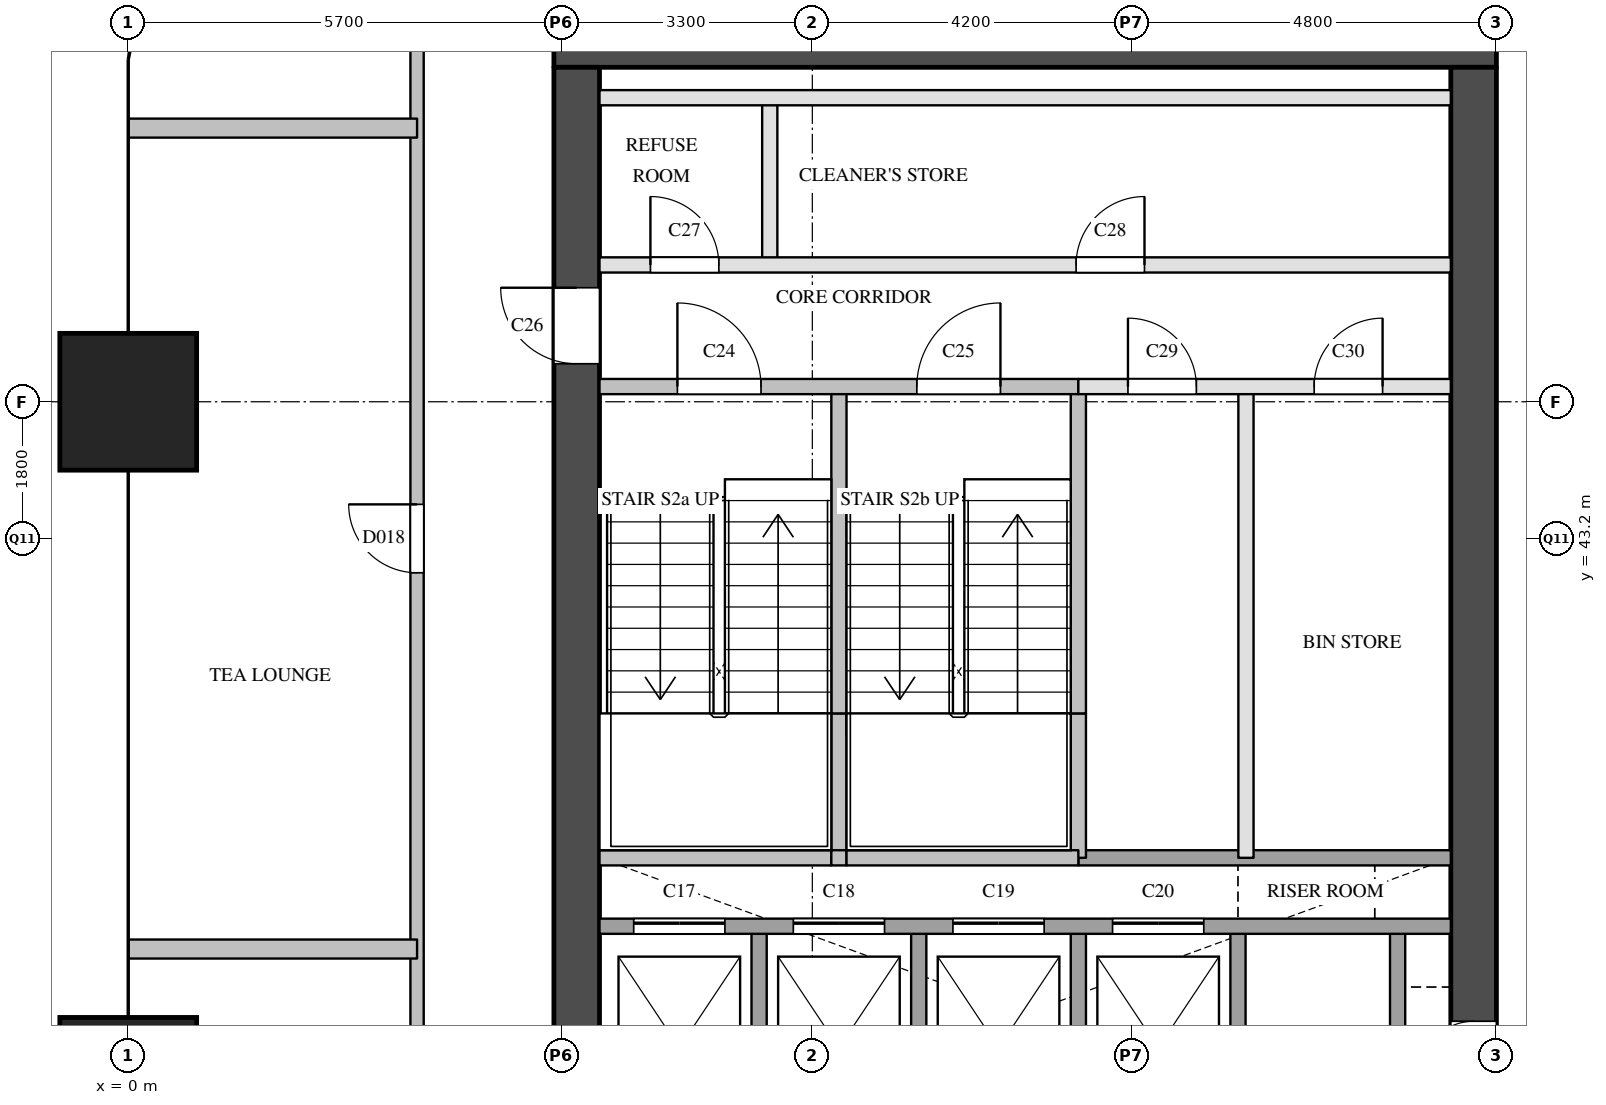
"""IFC4 building model, lengths in metres.
Left out: names, types, materials, properties, quantities, classifications, styles, units other than length and angle.
Written with IfcOpenShell. Run it as: python <this file> out.ifc"""

import sys

from ifc_helpers import new_model, si_unit, direction, frame, frame_2d, origin, origin_2d, place, context, subcontext, project, spatial, rectangle, extrude, element, fill, save


model = new_model("IFC4")
c1 = context("Model", 3, precision=1e-05, world=origin(), true_north=direction((0.0, 1.0)))
c2 = subcontext(c1, "Body", "Model", "MODEL_VIEW")
j1 = project(units=[si_unit("LENGTHUNIT", "METRE"), si_unit("PLANEANGLEUNIT", "RADIAN")], contexts=[c1])
p1 = place(None, origin())
s1 = spatial("IfcSite", under=j1, at=p1, CompositionType="ELEMENT")
p2 = place(p1, origin())
s2 = spatial("IfcBuilding", under=s1, at=p2, CompositionType="ELEMENT")
p3 = place(p2, frame((0.0, 0.0, 89.2)))
s3 = spatial("IfcBuildingStorey", under=s2, at=p3, CompositionType="ELEMENT", Elevation=89.2)
for number, where, z_axis, x_axis in (
    (1, (0.0, 36.0, 0.0), (0.0, 0.0, 1.0), (1.0, 0.0, 0.0)),
    (2, (0.0, 45.0, 0.0), (0.0, 0.0, 1.0), (1.0, 0.0, 0.0)),
):
    element("IfcColumn", number, at=place(p3, frame(where, z_axis=z_axis, x_axis=x_axis)), inside=s3, PredefinedType="COLUMN", context=c2, shape_type="SweptSolid", body=[
        extrude(rectangle(XDim=1.8, YDim=1.8, at=origin_2d()), origin(), (0.0, 0.0, 1.0), 3.8),
    ])
p4 = place(p3, frame((5.6, 49.7, 0.0), z_axis=(0.0, 0.0, 1.0), x_axis=(1.0, 0.0, 0.0)))
e3 = element("IfcWall", 3, at=p4, inside=s3, PredefinedType="SHEAR", context=c2, shape_type="SweptSolid", body=[
    extrude(rectangle(XDim=12.4, YDim=0.6, at=frame_2d((6.2, 0.0))), origin(), (0.0, 0.0, 1.0), 3.5),
])
p5 = place(p3, frame((5.9, 29.1, 0.0), z_axis=(0.0, 0.0, 1.0), x_axis=(0.0, 1.0, 0.0)))
e4 = element("IfcWall", 4, at=p5, inside=s3, PredefinedType="SHEAR", context=c2, shape_type="SweptSolid", body=[
    extrude(rectangle(XDim=20.3, YDim=0.6, at=frame_2d((10.15, 0.0))), origin(), (0.0, 0.0, 1.0), 3.5),
])
p6 = place(p5, frame((3.6, 0.0, 0.0)))
e5 = element("IfcOpeningElement", 5, at=p6, cuts=e4, PredefinedType="OPENING", context=c2, shape_type="SweptSolid", body=[
    extrude(rectangle(XDim=1.8, YDim=2.1, at=frame_2d((0.9, 1.05))), frame((0.0, 0.31, 0.0), z_axis=(0.0, -1.0, 0.0), x_axis=(1.0, 0.0, 0.0)), (0.0, 0.0, 1.0), 0.62),
])
p7 = place(p5, frame((16.4, 0.0, 0.0)))
e6 = element("IfcOpeningElement", 6, at=p7, cuts=e4, PredefinedType="OPENING", context=c2, shape_type="SweptSolid", body=[
    extrude(rectangle(XDim=1.0, YDim=2.1, at=frame_2d((0.5, 1.05))), frame((0.0, 0.31, 0.0), z_axis=(0.0, -1.0, 0.0), x_axis=(1.0, 0.0, 0.0)), (0.0, 0.0, 1.0), 0.62),
])
p8 = place(p3, frame((17.7, 29.1, 0.0), z_axis=(0.0, 0.0, 1.0), x_axis=(0.0, 1.0, 0.0)))
e7 = element("IfcWall", 7, at=p8, inside=s3, PredefinedType="SHEAR", context=c2, shape_type="SweptSolid", body=[
    extrude(rectangle(XDim=20.3, YDim=0.6, at=frame_2d((10.15, 0.0))), origin(), (0.0, 0.0, 1.0), 3.5),
])
p9 = place(p8, frame((1.25, 0.0, 0.0)))
e8 = element("IfcOpeningElement", 8, at=p9, cuts=e7, PredefinedType="OPENING", context=c2, shape_type="SweptSolid", body=[
    extrude(rectangle(XDim=0.7, YDim=2.1, at=frame_2d((0.35, 1.05))), frame((0.0, 0.31, 0.0), z_axis=(0.0, -1.0, 0.0), x_axis=(1.0, 0.0, 0.0)), (0.0, 0.0, 1.0), 0.62),
])
p10 = place(p8, frame((7.05, 0.0, 0.0)))
e9 = element("IfcOpeningElement", 9, at=p10, cuts=e7, PredefinedType="OPENING", context=c2, shape_type="SweptSolid", body=[
    extrude(rectangle(XDim=0.7, YDim=2.1, at=frame_2d((0.35, 1.05))), frame((0.0, 0.31, 0.0), z_axis=(0.0, -1.0, 0.0), x_axis=(1.0, 0.0, 0.0)), (0.0, 0.0, 1.0), 0.62),
])
p11 = place(p3, frame((8.3, 34.9, 0.0), z_axis=(0.0, 0.0, 1.0), x_axis=(0.0, 1.0, 0.0)))
e10 = element("IfcWall", 10, at=p11, inside=s3, PredefinedType="SOLIDWALL", context=c2, shape_type="SweptSolid", body=[
    extrude(rectangle(XDim=3.2, YDim=0.2, at=frame_2d((1.6, 0.0))), origin(), (0.0, 0.0, 1.0), 3.5),
])
p12 = place(p3, frame((8.44, 46.8, 0.0), z_axis=(0.0, 0.0, 1.0), x_axis=(0.0, 1.0, 0.0)))
e11 = element("IfcWall", 11, at=p12, inside=s3, PredefinedType="PARTITIONING", context=c2, shape_type="SweptSolid", body=[
    extrude(rectangle(XDim=2.2, YDim=0.2, at=frame_2d((1.1, 0.0))), origin(), (0.0, 0.0, 1.0), 3.5),
])
p13 = place(p3, frame((9.35, 39.0, 0.0), z_axis=(0.0, 0.0, 1.0), x_axis=(0.0, 1.0, 0.0)))
e12 = element("IfcWall", 12, at=p13, inside=s3, PredefinedType="SOLIDWALL", context=c2, shape_type="SweptSolid", body=[
    extrude(rectangle(XDim=1.9, YDim=0.2, at=frame_2d((0.95, 0.0))), origin(), (0.0, 0.0, 1.0), 3.5),
])
p14 = place(p3, frame((9.35, 40.9, 0.0), z_axis=(0.0, 0.0, 1.0), x_axis=(0.0, 1.0, 0.0)))
e13 = element("IfcWall", 13, at=p14, inside=s3, PredefinedType="SOLIDWALL", context=c2, shape_type="SweptSolid", body=[
    extrude(rectangle(XDim=4.3, YDim=0.2, at=frame_2d((2.15, 0.0))), origin(), (0.0, 0.0, 1.0), 3.5),
])
for number, where, z_axis, x_axis in (
    (14, (10.4, 34.9, 0.0), (0.0, 0.0, 1.0), (0.0, 1.0, 0.0)),
    (15, (12.5, 34.9, 0.0), (0.0, 0.0, 1.0), (0.0, 1.0, 0.0)),
):
    element("IfcWall", number, at=place(p3, frame(where, z_axis=z_axis, x_axis=x_axis)), inside=s3, PredefinedType="SOLIDWALL", context=c2, shape_type="SweptSolid", body=[
        extrude(rectangle(XDim=3.2, YDim=0.2, at=frame_2d((1.6, 0.0))), origin(), (0.0, 0.0, 1.0), 3.5),
    ])
p15 = place(p3, frame((12.5, 39.0, 0.0), z_axis=(0.0, 0.0, 1.0), x_axis=(0.0, 1.0, 0.0)))
e16 = element("IfcWall", 16, at=p15, inside=s3, PredefinedType="SOLIDWALL", context=c2, shape_type="SweptSolid", body=[
    extrude(rectangle(XDim=1.9, YDim=0.2, at=frame_2d((0.95, 0.0))), origin(), (0.0, 0.0, 1.0), 3.5),
])
p16 = place(p3, frame((12.5, 40.9, 0.0), z_axis=(0.0, 0.0, 1.0), x_axis=(0.0, 1.0, 0.0)))
e17 = element("IfcWall", 17, at=p16, inside=s3, PredefinedType="SOLIDWALL", context=c2, shape_type="SweptSolid", body=[
    extrude(rectangle(XDim=4.3, YDim=0.2, at=frame_2d((2.15, 0.0))), origin(), (0.0, 0.0, 1.0), 3.5),
])
p17 = place(p3, frame((14.6, 34.9, 0.0), z_axis=(0.0, 0.0, 1.0), x_axis=(0.0, 1.0, 0.0)))
e18 = element("IfcWall", 18, at=p17, inside=s3, PredefinedType="SOLIDWALL", context=c2, shape_type="SweptSolid", body=[
    extrude(rectangle(XDim=3.2, YDim=0.2, at=frame_2d((1.6, 0.0))), origin(), (0.0, 0.0, 1.0), 3.5),
])
p18 = place(p3, frame((14.705, 39.0, 0.0), z_axis=(0.0, 0.0, 1.0), x_axis=(0.0, 1.0, 0.0)))
e19 = element("IfcWall", 19, at=p18, inside=s3, PredefinedType="PARTITIONING", context=c2, shape_type="SweptSolid", body=[
    extrude(rectangle(XDim=6.2, YDim=0.2, at=frame_2d((3.1, 0.0))), origin(), (0.0, 0.0, 1.0), 3.5),
])
p19 = place(p3, frame((16.7, 34.9, 0.0), z_axis=(0.0, 0.0, 1.0), x_axis=(0.0, 1.0, 0.0)))
e20 = element("IfcWall", 20, at=p19, inside=s3, PredefinedType="SOLIDWALL", context=c2, shape_type="SweptSolid", body=[
    extrude(rectangle(XDim=3.2, YDim=0.2, at=frame_2d((1.6, 0.0))), origin(), (0.0, 0.0, 1.0), 3.5),
])
p20 = place(p3, frame((6.2, 38.1, 0.0), z_axis=(0.0, 0.0, 1.0), x_axis=(1.0, 0.0, 0.0)))
e21 = element("IfcWall", 21, at=p20, inside=s3, PredefinedType="SOLIDWALL", context=c2, shape_type="SweptSolid", body=[
    extrude(rectangle(XDim=11.2, YDim=0.2, at=frame_2d((5.6, 0.0))), origin(), (0.0, 0.0, 1.0), 3.5),
])
p21 = place(p20, frame((0.45, 0.0, 0.0)))
e22 = element("IfcOpeningElement", 22, at=p21, cuts=e21, PredefinedType="OPENING", context=c2, shape_type="SweptSolid", body=[
    extrude(rectangle(XDim=1.2, YDim=2.1, at=frame_2d((0.6, 1.05))), frame((0.0, 0.11, 0.0), z_axis=(0.0, -1.0, 0.0), x_axis=(1.0, 0.0, 0.0)), (0.0, 0.0, 1.0), 0.22),
])
p22 = place(p20, frame((2.55, 0.0, 0.0)))
e23 = element("IfcOpeningElement", 23, at=p22, cuts=e21, PredefinedType="OPENING", context=c2, shape_type="SweptSolid", body=[
    extrude(rectangle(XDim=1.2, YDim=2.1, at=frame_2d((0.6, 1.05))), frame((0.0, 0.11, 0.0), z_axis=(0.0, -1.0, 0.0), x_axis=(1.0, 0.0, 0.0)), (0.0, 0.0, 1.0), 0.22),
])
p23 = place(p20, frame((4.65, 0.0, 0.0)))
e24 = element("IfcOpeningElement", 24, at=p23, cuts=e21, PredefinedType="OPENING", context=c2, shape_type="SweptSolid", body=[
    extrude(rectangle(XDim=1.2, YDim=2.1, at=frame_2d((0.6, 1.05))), frame((0.0, 0.11, 0.0), z_axis=(0.0, -1.0, 0.0), x_axis=(1.0, 0.0, 0.0)), (0.0, 0.0, 1.0), 0.22),
])
p24 = place(p20, frame((6.75, 0.0, 0.0)))
e25 = element("IfcOpeningElement", 25, at=p24, cuts=e21, PredefinedType="OPENING", context=c2, shape_type="SweptSolid", body=[
    extrude(rectangle(XDim=1.2, YDim=2.1, at=frame_2d((0.6, 1.05))), frame((0.0, 0.11, 0.0), z_axis=(0.0, -1.0, 0.0), x_axis=(1.0, 0.0, 0.0)), (0.0, 0.0, 1.0), 0.22),
])
p25 = place(p3, frame((12.5, 39.0, 0.0), z_axis=(0.0, 0.0, 1.0), x_axis=(1.0, 0.0, 0.0)))
e26 = element("IfcWall", 26, at=p25, inside=s3, PredefinedType="SOLIDWALL", context=c2, shape_type="SweptSolid", body=[
    extrude(rectangle(XDim=4.9, YDim=0.2, at=frame_2d((2.45, 0.0))), origin(), (0.0, 0.0, 1.0), 3.5),
])
p26 = place(p3, frame((6.2, 39.0, 0.0), z_axis=(0.0, 0.0, 1.0), x_axis=(1.0, 0.0, 0.0)))
e27 = element("IfcWall", 27, at=p26, inside=s3, PredefinedType="SOLIDWALL", context=c2, shape_type="SweptSolid", body=[
    extrude(rectangle(XDim=3.05, YDim=0.2, at=frame_2d((1.525, 0.0))), origin(), (0.0, 0.0, 1.0), 3.5),
])
p27 = place(p3, frame((9.25, 39.0, 0.0), z_axis=(0.0, 0.0, 1.0), x_axis=(1.0, 0.0, 0.0)))
e28 = element("IfcWall", 28, at=p27, inside=s3, PredefinedType="SOLIDWALL", context=c2, shape_type="SweptSolid", body=[
    extrude(rectangle(XDim=0.2, YDim=0.2, at=frame_2d((0.1, 0.0))), origin(), (0.0, 0.0, 1.0), 3.5),
])
p28 = place(p3, frame((9.45, 39.0, 0.0), z_axis=(0.0, 0.0, 1.0), x_axis=(1.0, 0.0, 0.0)))
e29 = element("IfcWall", 29, at=p28, inside=s3, PredefinedType="SOLIDWALL", context=c2, shape_type="SweptSolid", body=[
    extrude(rectangle(XDim=3.05, YDim=0.2, at=frame_2d((1.525, 0.0))), origin(), (0.0, 0.0, 1.0), 3.5),
])
p29 = place(p3, frame((12.5, 45.2, 0.0), z_axis=(0.0, 0.0, 1.0), x_axis=(1.0, 0.0, 0.0)))
e30 = element("IfcWall", 30, at=p29, inside=s3, PredefinedType="PARTITIONING", context=c2, shape_type="SweptSolid", body=[
    extrude(rectangle(XDim=4.9, YDim=0.2, at=frame_2d((2.45, 0.0))), origin(), (0.0, 0.0, 1.0), 3.5),
])
p30 = place(p29, frame((0.653, 0.0, 0.0)))
e31 = element("IfcOpeningElement", 31, at=p30, cuts=e30, PredefinedType="OPENING", context=c2, shape_type="SweptSolid", body=[
    extrude(rectangle(XDim=0.9, YDim=2.1, at=frame_2d((0.45, 1.05))), frame((0.0, 0.11, 0.0), z_axis=(0.0, -1.0, 0.0), x_axis=(1.0, 0.0, 0.0)), (0.0, 0.0, 1.0), 0.22),
])
p31 = place(p29, frame((3.103, 0.0, 0.0)))
e32 = element("IfcOpeningElement", 32, at=p31, cuts=e30, PredefinedType="OPENING", context=c2, shape_type="SweptSolid", body=[
    extrude(rectangle(XDim=0.9, YDim=2.1, at=frame_2d((0.45, 1.05))), frame((0.0, 0.11, 0.0), z_axis=(0.0, -1.0, 0.0), x_axis=(1.0, 0.0, 0.0)), (0.0, 0.0, 1.0), 0.22),
])
p32 = place(p3, frame((6.2, 45.2, 0.0), z_axis=(0.0, 0.0, 1.0), x_axis=(1.0, 0.0, 0.0)))
e33 = element("IfcWall", 33, at=p32, inside=s3, PredefinedType="SOLIDWALL", context=c2, shape_type="SweptSolid", body=[
    extrude(rectangle(XDim=6.3, YDim=0.2, at=frame_2d((3.15, 0.0))), origin(), (0.0, 0.0, 1.0), 3.5),
])
p33 = place(p32, frame((1.025, 0.0, 0.0)))
e34 = element("IfcOpeningElement", 34, at=p33, cuts=e33, PredefinedType="OPENING", context=c2, shape_type="SweptSolid", body=[
    extrude(rectangle(XDim=1.1, YDim=2.1, at=frame_2d((0.55, 1.05))), frame((0.0, 0.11, 0.0), z_axis=(0.0, -1.0, 0.0), x_axis=(1.0, 0.0, 0.0)), (0.0, 0.0, 1.0), 0.22),
])
p34 = place(p32, frame((4.175, 0.0, 0.0)))
e35 = element("IfcOpeningElement", 35, at=p34, cuts=e33, PredefinedType="OPENING", context=c2, shape_type="SweptSolid", body=[
    extrude(rectangle(XDim=1.1, YDim=2.1, at=frame_2d((0.55, 1.05))), frame((0.0, 0.11, 0.0), z_axis=(0.0, -1.0, 0.0), x_axis=(1.0, 0.0, 0.0)), (0.0, 0.0, 1.0), 0.22),
])
p35 = place(p3, frame((6.2, 46.8, 0.0), z_axis=(0.0, 0.0, 1.0), x_axis=(1.0, 0.0, 0.0)))
e36 = element("IfcWall", 36, at=p35, inside=s3, PredefinedType="PARTITIONING", context=c2, shape_type="SweptSolid", body=[
    extrude(rectangle(XDim=11.2, YDim=0.2, at=frame_2d((5.6, 0.0))), origin(), (0.0, 0.0, 1.0), 3.5),
])
p36 = place(p35, frame((0.67, 0.0, 0.0)))
e37 = element("IfcOpeningElement", 37, at=p36, cuts=e36, PredefinedType="OPENING", context=c2, shape_type="SweptSolid", body=[
    extrude(rectangle(XDim=0.9, YDim=2.1, at=frame_2d((0.45, 1.05))), frame((0.0, 0.11, 0.0), z_axis=(0.0, -1.0, 0.0), x_axis=(1.0, 0.0, 0.0)), (0.0, 0.0, 1.0), 0.22),
])
p37 = place(p35, frame((6.27, 0.0, 0.0)))
e38 = element("IfcOpeningElement", 38, at=p37, cuts=e36, PredefinedType="OPENING", context=c2, shape_type="SweptSolid", body=[
    extrude(rectangle(XDim=0.9, YDim=2.1, at=frame_2d((0.45, 1.05))), frame((0.0, 0.11, 0.0), z_axis=(0.0, -1.0, 0.0), x_axis=(1.0, 0.0, 0.0)), (0.0, 0.0, 1.0), 0.22),
])
p38 = place(p3, frame((6.2, 49.0, 0.0), z_axis=(0.0, 0.0, 1.0), x_axis=(1.0, 0.0, 0.0)))
e39 = element("IfcWall", 39, at=p38, inside=s3, PredefinedType="PARTITIONING", context=c2, shape_type="SweptSolid", body=[
    extrude(rectangle(XDim=11.2, YDim=0.2, at=frame_2d((5.6, 0.0))), origin(), (0.0, 0.0, 1.0), 3.5),
])
p39 = place(p3, frame((3.8, 28.5, 0.0), z_axis=(0.0, 0.0, 1.0), x_axis=(0.0, 1.0, 0.0)))
e40 = element("IfcWall", 40, at=p39, inside=s3, PredefinedType="PARTITIONING", context=c2, shape_type="SweptSolid", body=[
    extrude(rectangle(XDim=23.3, YDim=0.175, at=frame_2d((11.65, 0.0))), origin(), (0.0, 0.0, 1.0), 3.5),
])
p40 = place(p39, frame((4.2, 0.0, 0.0)))
e41 = element("IfcOpeningElement", 41, at=p40, cuts=e40, PredefinedType="OPENING", context=c2, shape_type="SweptSolid", body=[
    extrude(rectangle(XDim=0.9, YDim=2.1, at=frame_2d((0.45, 1.05))), frame((0.0, 0.097, 0.0), z_axis=(0.0, -1.0, 0.0), x_axis=(1.0, 0.0, 0.0)), (0.0, 0.0, 1.0), 0.195),
])
p41 = place(p39, frame((14.25, 0.0, 0.0)))
e42 = element("IfcOpeningElement", 42, at=p41, cuts=e40, PredefinedType="OPENING", context=c2, shape_type="SweptSolid", body=[
    extrude(rectangle(XDim=0.9, YDim=2.1, at=frame_2d((0.45, 1.05))), frame((0.0, 0.097, 0.0), z_axis=(0.0, -1.0, 0.0), x_axis=(1.0, 0.0, 0.0)), (0.0, 0.0, 1.0), 0.195),
])
p42 = place(p39, frame((21.25, 0.0, 0.0)))
e43 = element("IfcOpeningElement", 43, at=p42, cuts=e40, PredefinedType="OPENING", context=c2, shape_type="SweptSolid", body=[
    extrude(rectangle(XDim=0.9, YDim=2.1, at=frame_2d((0.45, 1.05))), frame((0.0, 0.097, 0.0), z_axis=(0.0, -1.0, 0.0), x_axis=(1.0, 0.0, 0.0)), (0.0, 0.0, 1.0), 0.195),
])
for number, where, z_axis, x_axis in (
    (44, (0.0, 37.8, 0.0), (0.0, 0.0, 1.0), (1.0, 0.0, 0.0)),
    (45, (0.0, 48.6, 0.0), (0.0, 0.0, 1.0), (1.0, 0.0, 0.0)),
):
    element("IfcWall", number, at=place(p3, frame(where, z_axis=z_axis, x_axis=x_axis)), inside=s3, PredefinedType="PARTITIONING", context=c2, shape_type="SweptSolid", body=[
        extrude(rectangle(XDim=3.8, YDim=0.25, at=frame_2d((1.9, 0.0))), origin(), (0.0, 0.0, 1.0), 2.5),
    ])
p43 = place(p21, origin())
e46 = element("IfcDoor", 46, at=p43, inside=s3, OperationType="SLIDING_TO_LEFT", PredefinedType="DOOR", context=c2, shape_type="SweptSolid", body=[
    extrude(rectangle(XDim=1.2, YDim=2.1, at=frame_2d((0.6, 1.05))), frame((0.0, 0.025, 0.0), z_axis=(0.0, -1.0, 0.0), x_axis=(1.0, 0.0, 0.0)), (0.0, 0.0, 1.0), 0.05),
])
fill(e22, e46)
p44 = place(p22, origin())
e47 = element("IfcDoor", 47, at=p44, inside=s3, OperationType="SLIDING_TO_LEFT", PredefinedType="DOOR", context=c2, shape_type="SweptSolid", body=[
    extrude(rectangle(XDim=1.2, YDim=2.1, at=frame_2d((0.6, 1.05))), frame((0.0, 0.025, 0.0), z_axis=(0.0, -1.0, 0.0), x_axis=(1.0, 0.0, 0.0)), (0.0, 0.0, 1.0), 0.05),
])
fill(e23, e47)
p45 = place(p23, origin())
e48 = element("IfcDoor", 48, at=p45, inside=s3, OperationType="SLIDING_TO_LEFT", PredefinedType="DOOR", context=c2, shape_type="SweptSolid", body=[
    extrude(rectangle(XDim=1.2, YDim=2.1, at=frame_2d((0.6, 1.05))), frame((0.0, 0.025, 0.0), z_axis=(0.0, -1.0, 0.0), x_axis=(1.0, 0.0, 0.0)), (0.0, 0.0, 1.0), 0.05),
])
fill(e24, e48)
p46 = place(p24, origin())
e49 = element("IfcDoor", 49, at=p46, inside=s3, OperationType="SLIDING_TO_LEFT", PredefinedType="DOOR", context=c2, shape_type="SweptSolid", body=[
    extrude(rectangle(XDim=1.2, YDim=2.1, at=frame_2d((0.6, 1.05))), frame((0.0, 0.025, 0.0), z_axis=(0.0, -1.0, 0.0), x_axis=(1.0, 0.0, 0.0)), (0.0, 0.0, 1.0), 0.05),
])
fill(e25, e49)
p47 = place(p10, origin())
e50 = element("IfcDoor", 50, at=p47, inside=s3, OperationType="SINGLE_SWING_LEFT", PredefinedType="DOOR", context=c2, shape_type="SweptSolid", body=[
    extrude(rectangle(XDim=0.7, YDim=2.1, at=frame_2d((0.35, 1.05))), frame((0.0, 0.025, 0.0), z_axis=(0.0, -1.0, 0.0), x_axis=(1.0, 0.0, 0.0)), (0.0, 0.0, 1.0), 0.05),
])
fill(e9, e50)
p48 = place(p33, origin())
e51 = element("IfcDoor", 51, at=p48, inside=s3, OperationType="SINGLE_SWING_LEFT", PredefinedType="DOOR", context=c2, shape_type="SweptSolid", body=[
    extrude(rectangle(XDim=1.1, YDim=2.1, at=frame_2d((0.55, 1.05))), frame((0.0, 0.025, 0.0), z_axis=(0.0, -1.0, 0.0), x_axis=(1.0, 0.0, 0.0)), (0.0, 0.0, 1.0), 0.05),
])
fill(e34, e51)
p49 = place(p34, origin())
e52 = element("IfcDoor", 52, at=p49, inside=s3, OperationType="SINGLE_SWING_RIGHT", PredefinedType="DOOR", context=c2, shape_type="SweptSolid", body=[
    extrude(rectangle(XDim=1.1, YDim=2.1, at=frame_2d((0.55, 1.05))), frame((0.0, 0.025, 0.0), z_axis=(0.0, -1.0, 0.0), x_axis=(1.0, 0.0, 0.0)), (0.0, 0.0, 1.0), 0.05),
])
fill(e35, e52)
p50 = place(p7, origin())
e53 = element("IfcDoor", 53, at=p50, inside=s3, OperationType="SINGLE_SWING_RIGHT", PredefinedType="DOOR", context=c2, shape_type="SweptSolid", body=[
    extrude(rectangle(XDim=1.0, YDim=2.1, at=frame_2d((0.5, 1.05))), frame((0.0, 0.025, 0.0), z_axis=(0.0, -1.0, 0.0), x_axis=(1.0, 0.0, 0.0)), (0.0, 0.0, 1.0), 0.05),
])
fill(e6, e53)
p51 = place(p36, origin())
e54 = element("IfcDoor", 54, at=p51, inside=s3, OperationType="SINGLE_SWING_LEFT", PredefinedType="DOOR", context=c2, shape_type="SweptSolid", body=[
    extrude(rectangle(XDim=0.9, YDim=2.1, at=frame_2d((0.45, 1.05))), frame((0.0, 0.025, 0.0), z_axis=(0.0, -1.0, 0.0), x_axis=(1.0, 0.0, 0.0)), (0.0, 0.0, 1.0), 0.05),
])
fill(e37, e54)
p52 = place(p37, origin())
e55 = element("IfcDoor", 55, at=p52, inside=s3, OperationType="SINGLE_SWING_RIGHT", PredefinedType="DOOR", context=c2, shape_type="SweptSolid", body=[
    extrude(rectangle(XDim=0.9, YDim=2.1, at=frame_2d((0.45, 1.05))), frame((0.0, 0.025, 0.0), z_axis=(0.0, -1.0, 0.0), x_axis=(1.0, 0.0, 0.0)), (0.0, 0.0, 1.0), 0.05),
])
fill(e38, e55)
p53 = place(p30, origin())
e56 = element("IfcDoor", 56, at=p53, inside=s3, OperationType="SINGLE_SWING_LEFT", PredefinedType="DOOR", context=c2, shape_type="SweptSolid", body=[
    extrude(rectangle(XDim=0.9, YDim=2.1, at=frame_2d((0.45, 1.05))), frame((0.0, 0.025, 0.0), z_axis=(0.0, -1.0, 0.0), x_axis=(1.0, 0.0, 0.0)), (0.0, 0.0, 1.0), 0.05),
])
fill(e31, e56)
p54 = place(p31, origin())
e57 = element("IfcDoor", 57, at=p54, inside=s3, OperationType="SINGLE_SWING_RIGHT", PredefinedType="DOOR", context=c2, shape_type="SweptSolid", body=[
    extrude(rectangle(XDim=0.9, YDim=2.1, at=frame_2d((0.45, 1.05))), frame((0.0, 0.025, 0.0), z_axis=(0.0, -1.0, 0.0), x_axis=(1.0, 0.0, 0.0)), (0.0, 0.0, 1.0), 0.05),
])
fill(e32, e57)
p55 = place(p41, origin())
e58 = element("IfcDoor", 58, at=p55, inside=s3, OperationType="SINGLE_SWING_RIGHT", PredefinedType="DOOR", context=c2, shape_type="SweptSolid", body=[
    extrude(rectangle(XDim=0.9, YDim=2.1, at=frame_2d((0.45, 1.05))), frame((0.0, 0.025, 0.0), z_axis=(0.0, -1.0, 0.0), x_axis=(1.0, 0.0, 0.0)), (0.0, 0.0, 1.0), 0.05),
])
fill(e42, e58)
save(model, sys.argv[1])
